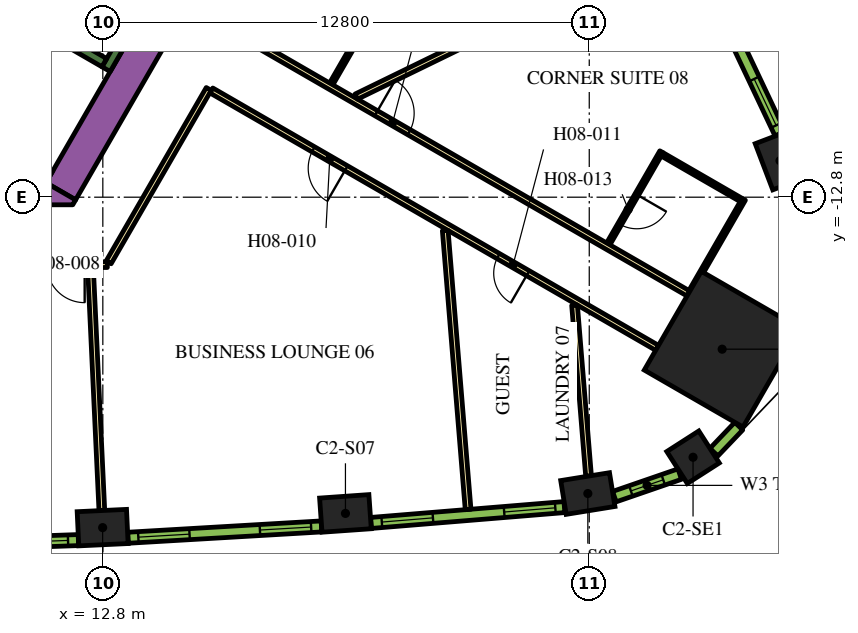
"""IFC4 building model, lengths in metres.
Left out: names, types, materials, properties, quantities, classifications, styles, units other than length and angle.
Written with IfcOpenShell. Run it as: python <this file> out.ifc"""

import sys

from ifc_helpers import new_model, si_unit, direction, frame, frame_2d, origin, origin_2d, place, context, subcontext, project, spatial, polyline, rectangle, outline, extrude, element, fill, save


model = new_model("IFC4")
c1 = context("Model", 3, precision=1e-05, world=origin(), true_north=direction((0.0, 1.0)))
c2 = subcontext(c1, "Body", "Model", "MODEL_VIEW")
j1 = project(units=[si_unit("LENGTHUNIT", "METRE"), si_unit("PLANEANGLEUNIT", "RADIAN")], contexts=[c1])
p1 = place(None, origin())
s1 = spatial("IfcSite", under=j1, at=p1, CompositionType="ELEMENT")
p2 = place(p1, origin())
s2 = spatial("IfcBuilding", under=s1, at=p2, CompositionType="ELEMENT")
p3 = place(p2, frame((0.0, 0.0, 107.1)))
s3 = spatial("IfcBuildingStorey", under=s2, at=p3, CompositionType="ELEMENT", Elevation=107.1)
p4 = place(p3, frame((29.097, -16.799, 0.0), z_axis=(0.0, 0.0, 1.0), x_axis=(0.866025403784, -0.5, 0.0)))
e1 = element("IfcColumn", 1, at=p4, inside=s3, PredefinedType="COLUMN", context=c2, shape_type="SweptSolid", body=[
    extrude(rectangle(XDim=3.0, YDim=3.0, at=origin_2d()), origin(), (0.0, 0.0, 1.0), 3.9),
])
for number, where, z_axis, x_axis in (
    (2, (12.795, -21.494, 0.0), (0.0, 0.0, 1.0), (0.999, 0.047, 0.0)),
    (3, (19.184, -21.12, 0.0), (0.0, 0.0, 1.0), (0.998, 0.07, 0.0)),
    (4, (25.563, -20.597, 0.0), (0.0, 0.0, 1.0), (0.987, 0.159, 0.0)),
):
    element("IfcColumn", number, at=place(p3, frame(where, z_axis=z_axis, x_axis=x_axis)), inside=s3, PredefinedType="COLUMN", context=c2, shape_type="SweptSolid", body=[
        extrude(rectangle(XDim=1.3, YDim=0.9, at=origin_2d()), origin(), (0.0, 0.0, 1.0), 3.9),
    ])
p5 = place(p3, frame((28.331, -19.643, 0.0), z_axis=(0.0, 0.0, 1.0), x_axis=(0.841700252504, 0.53994507585, 0.0)))
e5 = element("IfcColumn", 5, at=p5, inside=s3, PredefinedType="COLUMN", context=c2, shape_type="SweptSolid", body=[
    extrude(rectangle(XDim=1.0, YDim=1.0, at=origin_2d()), origin(), (0.0, 0.0, 1.0), 3.9),
])
p6 = place(p3, frame((30.619, -11.839, 0.0), z_axis=(0.0, 0.0, 1.0), x_axis=(-0.355493616145, 0.934678708905, 0.0)))
e6 = element("IfcColumn", 6, at=p6, inside=s3, PredefinedType="COLUMN", context=c2, shape_type="SweptSolid", body=[
    extrude(rectangle(XDim=1.3, YDim=0.9, at=origin_2d()), origin(), (0.0, 0.0, 1.0), 3.9),
])
p7 = place(p3, frame((11.695, -12.644, 0.0), z_axis=(0.0, 0.0, 1.0), x_axis=(0.500010229568, 0.86601949766, 0.0)))
e7 = element("IfcWall", 7, at=p7, inside=s3, PredefinedType="SOLIDWALL", context=c2, shape_type="SweptSolid", body=[
    extrude(rectangle(XDim=9.326, YDim=0.9, at=frame_2d((4.663, 0.0))), origin(), (0.0, 0.0, 1.0), 3.9),
])
p8 = place(p3, origin())
e8 = element("IfcWall", 8, at=p8, inside=s3, PredefinedType="SOLIDWALL", context=c2, shape_type="SweptSolid", body=[
    extrude(outline(polyline([(12.009, -13.0), (11.312, -13.0), (11.312, -12.425), (12.083, -12.871), (12.009, -13.0)])), origin(), (0.0, 0.0, 1.0), 3.9),
])
e9 = element("IfcWall", 9, at=p8, inside=s3, PredefinedType="SOLIDWALL", context=c2, shape_type="SweptSolid", body=[
    extrude(outline(polyline([(11.489, -12.1), (11.312, -12.407), (11.312, -12.1), (11.489, -12.1)])), origin(), (0.0, 0.0, 1.0), 3.9),
])
p9 = place(p3, frame((12.885, -9.431, 0.0), z_axis=(0.0, 0.0, 1.0), x_axis=(0.500020560727, 0.866013532718, 0.0)))
e10 = element("IfcWall", 10, at=p9, inside=s3, PredefinedType="SOLIDWALL", context=c2, shape_type="SweptSolid", body=[
    extrude(rectangle(XDim=3.45, YDim=0.25, at=frame_2d((1.725, 0.0))), origin(), (0.0, 0.0, 1.0), 3.9),
])
p10 = place(p3, frame((12.84, -9.261, 0.0), z_axis=(0.0, 0.0, 1.0), x_axis=(-0.866013990052, 0.500019768644, 0.0)))
e11 = element("IfcWall", 11, at=p10, inside=s3, PredefinedType="SOLIDWALL", context=c2, shape_type="SweptSolid", body=[
    extrude(rectangle(XDim=6.8, YDim=0.25, at=frame_2d((3.4, 0.0))), origin(), (0.0, 0.0, 1.0), 3.9),
])
p11 = place(p3, frame((16.412, -8.523, 0.0), z_axis=(0.0, 0.0, 1.0), x_axis=(0.866025629663, -0.499999608766, 0.0)))
e12 = element("IfcWall", 12, at=p11, inside=s3, PredefinedType="PARTITIONING", context=c2, shape_type="SweptSolid", body=[
    extrude(rectangle(XDim=13.624, YDim=0.15, at=frame_2d((6.812, 0.0))), origin(), (0.0, 0.0, 1.0), 2.75),
])
p12 = place(p11, frame((4.134, 0.0, 0.0)))
e13 = element("IfcOpeningElement", 13, at=p12, cuts=e12, PredefinedType="OPENING", context=c2, shape_type="SweptSolid", body=[
    extrude(rectangle(XDim=1.0, YDim=2.1, at=frame_2d((0.5, 1.05))), frame((0.0, 0.085, 0.0), z_axis=(0.0, -1.0, 0.0), x_axis=(1.0, 0.0, 0.0)), (0.0, 0.0, 1.0), 0.17),
])
p13 = place(p3, frame((12.918, -14.575, 0.0), z_axis=(0.0, 0.0, 1.0), x_axis=(-1.0, 0.0, 0.0)))
e14 = element("IfcWall", 14, at=p13, inside=s3, PredefinedType="PARTITIONING", context=c2, shape_type="SweptSolid", body=[
    extrude(rectangle(XDim=25.766, YDim=0.15, at=frame_2d((12.883, 0.0))), origin(), (0.0, 0.0, 1.0), 2.75),
])
p14 = place(p13, frame((24.586, 0.0, 0.0)))
e15 = element("IfcOpeningElement", 15, at=p14, cuts=e14, PredefinedType="OPENING", context=c2, shape_type="SweptSolid", body=[
    extrude(rectangle(XDim=1.0, YDim=2.1, at=frame_2d((0.5, 1.05))), frame((0.0, 0.085, 0.0), z_axis=(0.0, -1.0, 0.0), x_axis=(1.0, 0.0, 0.0)), (0.0, 0.0, 1.0), 0.17),
])
p15 = place(p13, frame((13.144, 0.0, 0.0)))
e16 = element("IfcOpeningElement", 16, at=p15, cuts=e14, PredefinedType="OPENING", context=c2, shape_type="SweptSolid", body=[
    extrude(rectangle(XDim=1.0, YDim=2.1, at=frame_2d((0.5, 1.05))), frame((0.0, 0.085, 0.0), z_axis=(0.0, -1.0, 0.0), x_axis=(1.0, 0.0, 0.0)), (0.0, 0.0, 1.0), 0.17),
])
p16 = place(p13, frame((10.874, 0.0, 0.0)))
e17 = element("IfcOpeningElement", 17, at=p16, cuts=e14, PredefinedType="OPENING", context=c2, shape_type="SweptSolid", body=[
    extrude(rectangle(XDim=0.9, YDim=2.1, at=frame_2d((0.45, 1.05))), frame((0.0, 0.085, 0.0), z_axis=(0.0, -1.0, 0.0), x_axis=(1.0, 0.0, 0.0)), (0.0, 0.0, 1.0), 0.17),
])
p17 = place(p13, frame((0.596, 0.0, 0.0)))
e18 = element("IfcOpeningElement", 18, at=p17, cuts=e14, PredefinedType="OPENING", context=c2, shape_type="SweptSolid", body=[
    extrude(rectangle(XDim=1.0, YDim=2.1, at=frame_2d((0.5, 1.05))), frame((0.0, 0.085, 0.0), z_axis=(0.0, -1.0, 0.0), x_axis=(1.0, 0.0, 0.0)), (0.0, 0.0, 1.0), 0.17),
])
p18 = place(p3, frame((15.587, -9.952, 0.0), z_axis=(0.0, 0.0, 1.0), x_axis=(-0.500016618951, -0.866015808616, 0.0)))
e19 = element("IfcWall", 19, at=p18, inside=s3, PredefinedType="PARTITIONING", context=c2, shape_type="SweptSolid", body=[
    extrude(rectangle(XDim=5.268, YDim=0.15, at=frame_2d((2.634, 0.0))), origin(), (0.0, 0.0, 1.0), 2.75),
])
p19 = place(p3, frame((27.386, -16.764, 0.0), z_axis=(0.0, 0.0, 1.0), x_axis=(-0.866022585856, 0.500004880763, 0.0)))
e20 = element("IfcWall", 20, at=p19, inside=s3, PredefinedType="PARTITIONING", context=c2, shape_type="SweptSolid", body=[
    extrude(rectangle(XDim=13.544, YDim=0.15, at=frame_2d((6.772, 0.0))), origin(), (0.0, 0.0, 1.0), 2.75),
])
p20 = place(p19, frame((9.447, 0.0, 0.0)))
e21 = element("IfcOpeningElement", 21, at=p20, cuts=e20, PredefinedType="OPENING", context=c2, shape_type="SweptSolid", body=[
    extrude(rectangle(XDim=1.0, YDim=2.1, at=frame_2d((0.5, 1.05))), frame((0.0, 0.085, 0.0), z_axis=(0.0, -1.0, 0.0), x_axis=(1.0, 0.0, 0.0)), (0.0, 0.0, 1.0), 0.17),
])
p21 = place(p19, frame((3.926, 0.0, 0.0)))
e22 = element("IfcOpeningElement", 22, at=p21, cuts=e20, PredefinedType="OPENING", context=c2, shape_type="SweptSolid", body=[
    extrude(rectangle(XDim=0.9, YDim=2.1, at=frame_2d((0.45, 1.05))), frame((0.0, 0.085, 0.0), z_axis=(0.0, -1.0, 0.0), x_axis=(1.0, 0.0, 0.0)), (0.0, 0.0, 1.0), 0.17),
])
p22 = place(p3, frame((12.774, -21.045, 0.0), z_axis=(0.0, 0.0, 1.0), x_axis=(-0.046750341626, 0.998906605023, 0.0)))
e23 = element("IfcWall", 23, at=p22, inside=s3, PredefinedType="PARTITIONING", context=c2, shape_type="SweptSolid", body=[
    extrude(rectangle(XDim=6.392, YDim=0.15, at=frame_2d((3.196, 0.0))), origin(), (0.0, 0.0, 1.0), 2.75),
])
p23 = place(p3, frame((27.478, -6.251, 0.0), z_axis=(0.0, 0.0, 1.0), x_axis=(-0.898940618603, -0.438070501432, 0.0)))
e24 = element("IfcWall", 24, at=p23, inside=s3, PredefinedType="PARTITIONING", context=c2, shape_type="SweptSolid", body=[
    extrude(rectangle(XDim=8.909, YDim=0.15, at=frame_2d((4.455, 0.0))), origin(), (0.0, 0.0, 1.0), 2.75),
])
p24 = place(p3, frame((22.412, -21.016, 0.0), z_axis=(0.0, 0.0, 1.0), x_axis=(-0.081744540534, 0.996653314896, 0.0)))
e25 = element("IfcWall", 25, at=p24, inside=s3, PredefinedType="PARTITIONING", context=c2, shape_type="SweptSolid", body=[
    extrude(rectangle(XDim=7.362, YDim=0.15, at=frame_2d((3.681, 0.0))), origin(), (0.0, 0.0, 1.0), 2.75),
])
p25 = place(p3, frame((25.582, -20.138, 0.0), z_axis=(0.0, 0.0, 1.0), x_axis=(-0.081746132986, 0.996653184283, 0.0)))
e26 = element("IfcWall", 26, at=p25, inside=s3, PredefinedType="PARTITIONING", context=c2, shape_type="SweptSolid", body=[
    extrude(rectangle(XDim=4.51, YDim=0.15, at=frame_2d((2.255, 0.0))), origin(), (0.0, 0.0, 1.0), 2.75),
])
p26 = place(p3, frame((27.5, -11.605, 0.0), z_axis=(0.0, 0.0, 1.0), x_axis=(-0.500049511043, -0.865996816683, 0.0)))
e27 = element("IfcWall", 27, at=p26, inside=s3, PredefinedType="PARTITIONING", context=c2, shape_type="SweptSolid", body=[
    extrude(rectangle(XDim=2.8, YDim=0.1, at=frame_2d((1.4, 0.0))), origin(), (0.0, 0.0, 1.0), 2.75),
])
p27 = place(p26, frame((1.3, 0.0, 0.0)))
e28 = element("IfcOpeningElement", 28, at=p27, cuts=e27, PredefinedType="OPENING", context=c2, shape_type="SweptSolid", body=[
    extrude(rectangle(XDim=0.9, YDim=2.1, at=frame_2d((0.45, 1.05))), frame((0.0, 0.06, 0.0), z_axis=(0.0, -1.0, 0.0), x_axis=(1.0, 0.0, 0.0)), (0.0, 0.0, 1.0), 0.12),
])
p28 = place(p3, frame((27.519, -11.673, 0.0), z_axis=(0.0, 0.0, 1.0), x_axis=(0.866024647952, -0.500001309137, 0.0)))
e29 = element("IfcWall", 29, at=p28, inside=s3, PredefinedType="PARTITIONING", context=c2, shape_type="SweptSolid", body=[
    extrude(rectangle(XDim=2.4, YDim=0.1, at=frame_2d((1.2, 0.0))), origin(), (0.0, 0.0, 1.0), 2.75),
])
p29 = place(p3, frame((28.265, -15.28, 0.0), z_axis=(0.0, 0.0, 1.0), x_axis=(0.500049511043, 0.865996816683, 0.0)))
e30 = element("IfcWall", 30, at=p29, inside=s3, PredefinedType="PARTITIONING", context=c2, shape_type="SweptSolid", body=[
    extrude(rectangle(XDim=2.8, YDim=0.1, at=frame_2d((1.4, 0.0))), origin(), (0.0, 0.0, 1.0), 2.75),
])
p30 = place(p3, frame((19.877, -7.972, 0.0), z_axis=(0.0, 0.0, 1.0), x_axis=(-0.500010206181, -0.866019511163, 0.0)))
e31 = element("IfcWall", 31, at=p30, inside=s3, PredefinedType="PARTITIONING", context=c2, shape_type="SweptSolid", body=[
    extrude(rectangle(XDim=2.13, YDim=0.1, at=frame_2d((1.065, 0.0))), origin(), (0.0, 0.0, 1.0), 2.75),
])
p31 = place(p3, frame((7.059, -22.001, 0.0), z_axis=(0.0, 0.0, 1.0), x_axis=(0.999385993957, 0.035037623812, 0.0)))
e32 = element("IfcWall", 32, at=p31, inside=s3, PredefinedType="SOLIDWALL", context=c2, shape_type="SweptSolid", body=[
    extrude(rectangle(XDim=5.101, YDim=0.29, at=frame_2d((2.55, 0.0))), origin(), (0.0, 0.0, 1.0), 3.65),
])
p32 = place(p31, frame((0.273, 0.0, 0.9)))
e33 = element("IfcOpeningElement", 33, at=p32, cuts=e32, PredefinedType="OPENING", context=c2, shape_type="SweptSolid", body=[
    extrude(rectangle(XDim=1.35, YDim=2.15, at=frame_2d((0.675, 1.075))), frame((0.0, 0.155, 0.0), z_axis=(0.0, -1.0, 0.0), x_axis=(1.0, 0.0, 0.0)), (0.0, 0.0, 1.0), 0.31),
])
p33 = place(p31, frame((3.478, 0.0, 0.9)))
e34 = element("IfcOpeningElement", 34, at=p33, cuts=e32, PredefinedType="OPENING", context=c2, shape_type="SweptSolid", body=[
    extrude(rectangle(XDim=1.35, YDim=2.15, at=frame_2d((0.675, 1.075))), frame((0.0, 0.155, 0.0), z_axis=(0.0, -1.0, 0.0), x_axis=(1.0, 0.0, 0.0)), (0.0, 0.0, 1.0), 0.31),
])
p34 = place(p3, frame((13.462, -21.761, 0.0), z_axis=(0.0, 0.0, 1.0), x_axis=(0.998290511436, 0.058447025388, 0.0)))
e35 = element("IfcWall", 35, at=p34, inside=s3, PredefinedType="SOLIDWALL", context=c2, shape_type="SweptSolid", body=[
    extrude(rectangle(XDim=5.1, YDim=0.29, at=frame_2d((2.55, 0.0))), origin(), (0.0, 0.0, 1.0), 3.65),
])
p35 = place(p34, frame((0.272, 0.0, 0.9)))
e36 = element("IfcOpeningElement", 36, at=p35, cuts=e35, PredefinedType="OPENING", context=c2, shape_type="SweptSolid", body=[
    extrude(rectangle(XDim=1.35, YDim=2.15, at=frame_2d((0.675, 1.075))), frame((0.0, 0.155, 0.0), z_axis=(0.0, -1.0, 0.0), x_axis=(1.0, 0.0, 0.0)), (0.0, 0.0, 1.0), 0.31),
])
p36 = place(p34, frame((3.478, 0.0, 0.9)))
e37 = element("IfcOpeningElement", 37, at=p36, cuts=e35, PredefinedType="OPENING", context=c2, shape_type="SweptSolid", body=[
    extrude(rectangle(XDim=1.35, YDim=2.15, at=frame_2d((0.675, 1.075))), frame((0.0, 0.155, 0.0), z_axis=(0.0, -1.0, 0.0), x_axis=(1.0, 0.0, 0.0)), (0.0, 0.0, 1.0), 0.31),
])
p37 = place(p3, frame((19.857, -21.371, 0.0), z_axis=(0.0, 0.0, 1.0), x_axis=(0.99665273362, 0.081751627308, 0.0)))
e38 = element("IfcWall", 38, at=p37, inside=s3, PredefinedType="SOLIDWALL", context=c2, shape_type="SweptSolid", body=[
    extrude(rectangle(XDim=5.107, YDim=0.29, at=frame_2d((2.553, 0.0))), origin(), (0.0, 0.0, 1.0), 3.65),
])
p38 = place(p37, frame((0.285, 0.0, 0.9)))
e39 = element("IfcOpeningElement", 39, at=p38, cuts=e38, PredefinedType="OPENING", context=c2, shape_type="SweptSolid", body=[
    extrude(rectangle(XDim=1.35, YDim=2.15, at=frame_2d((0.675, 1.075))), frame((0.0, 0.155, 0.0), z_axis=(0.0, -1.0, 0.0), x_axis=(1.0, 0.0, 0.0)), (0.0, 0.0, 1.0), 0.31),
])
p39 = place(p37, frame((3.516, 0.0, 0.9)))
e40 = element("IfcOpeningElement", 40, at=p39, cuts=e38, PredefinedType="OPENING", context=c2, shape_type="SweptSolid", body=[
    extrude(rectangle(XDim=1.35, YDim=2.15, at=frame_2d((0.675, 1.075))), frame((0.0, 0.155, 0.0), z_axis=(0.0, -1.0, 0.0), x_axis=(1.0, 0.0, 0.0)), (0.0, 0.0, 1.0), 0.31),
])
p40 = place(p3, frame((26.261, -20.679, 0.0), z_axis=(0.0, 0.0, 1.0), x_axis=(0.945385815453, 0.325953462844, 0.0)))
e41 = element("IfcWall", 41, at=p40, inside=s3, PredefinedType="SOLIDWALL", context=c2, shape_type="SweptSolid", body=[
    extrude(rectangle(XDim=1.819, YDim=0.29, at=frame_2d((0.91, 0.0))), origin(), (0.0, 0.0, 1.0), 3.65),
])
p41 = place(p40, frame((0.46, 0.0, 0.9)))
e42 = element("IfcOpeningElement", 42, at=p41, cuts=e41, PredefinedType="OPENING", context=c2, shape_type="SweptSolid", body=[
    extrude(rectangle(XDim=0.9, YDim=2.15, at=frame_2d((0.45, 1.075))), frame((0.0, 0.155, 0.0), z_axis=(0.0, -1.0, 0.0), x_axis=(1.0, 0.0, 0.0)), (0.0, 0.0, 1.0), 0.31),
])
p42 = place(p3, frame((28.88, -19.509, 0.0), z_axis=(0.0, 0.0, 1.0), x_axis=(0.690414427296, 0.723414071319, 0.0)))
e43 = element("IfcWall", 43, at=p42, inside=s3, PredefinedType="SOLIDWALL", context=c2, shape_type="SweptSolid", body=[
    extrude(rectangle(XDim=0.947, YDim=0.29, at=frame_2d((0.474, 0.0))), origin(), (0.0, 0.0, 1.0), 3.65),
])
p43 = place(p3, frame((30.62, -11.127, 0.0), z_axis=(0.0, 0.0, 1.0), x_axis=(-0.427543726596, 0.903994669148, 0.0)))
e44 = element("IfcWall", 44, at=p43, inside=s3, PredefinedType="SOLIDWALL", context=c2, shape_type="SweptSolid", body=[
    extrude(rectangle(XDim=5.107, YDim=0.29, at=frame_2d((2.553, 0.0))), origin(), (0.0, 0.0, 1.0), 3.65),
])
p44 = place(p43, frame((0.24, 0.0, 0.9)))
e45 = element("IfcOpeningElement", 45, at=p44, cuts=e44, PredefinedType="OPENING", context=c2, shape_type="SweptSolid", body=[
    extrude(rectangle(XDim=1.35, YDim=2.15, at=frame_2d((0.675, 1.075))), frame((0.0, 0.155, 0.0), z_axis=(0.0, -1.0, 0.0), x_axis=(1.0, 0.0, 0.0)), (0.0, 0.0, 1.0), 0.31),
])
p45 = place(p43, frame((3.471, 0.0, 0.9)))
e46 = element("IfcOpeningElement", 46, at=p45, cuts=e44, PredefinedType="OPENING", context=c2, shape_type="SweptSolid", body=[
    extrude(rectangle(XDim=1.35, YDim=2.15, at=frame_2d((0.675, 1.075))), frame((0.0, 0.155, 0.0), z_axis=(0.0, -1.0, 0.0), x_axis=(1.0, 0.0, 0.0)), (0.0, 0.0, 1.0), 0.31),
])
p46 = place(p17, origin())
e47 = element("IfcDoor", 47, at=p46, inside=s3, OperationType="SINGLE_SWING_LEFT", PredefinedType="DOOR", context=c2, shape_type="SweptSolid", body=[
    extrude(rectangle(XDim=1.0, YDim=2.1, at=frame_2d((0.5, 1.05))), frame((0.0, 0.025, 0.0), z_axis=(0.0, -1.0, 0.0), x_axis=(1.0, 0.0, 0.0)), (0.0, 0.0, 1.0), 0.05),
])
fill(e18, e47)
p47 = place(p20, origin())
e48 = element("IfcDoor", 48, at=p47, inside=s3, OperationType="SINGLE_SWING_RIGHT", PredefinedType="DOOR", context=c2, shape_type="SweptSolid", body=[
    extrude(rectangle(XDim=1.0, YDim=2.1, at=frame_2d((0.5, 1.05))), frame((0.0, 0.025, 0.0), z_axis=(0.0, -1.0, 0.0), x_axis=(1.0, 0.0, 0.0)), (0.0, 0.0, 1.0), 0.05),
])
fill(e21, e48)
p48 = place(p21, origin())
e49 = element("IfcDoor", 49, at=p48, inside=s3, OperationType="SINGLE_SWING_LEFT", PredefinedType="DOOR", context=c2, shape_type="SweptSolid", body=[
    extrude(rectangle(XDim=0.9, YDim=2.1, at=frame_2d((0.45, 1.05))), frame((0.0, 0.025, 0.0), z_axis=(0.0, -1.0, 0.0), x_axis=(1.0, 0.0, 0.0)), (0.0, 0.0, 1.0), 0.05),
])
fill(e22, e49)
p49 = place(p12, origin())
e50 = element("IfcDoor", 50, at=p49, inside=s3, OperationType="SINGLE_SWING_LEFT", PredefinedType="DOOR", context=c2, shape_type="SweptSolid", body=[
    extrude(rectangle(XDim=1.0, YDim=2.1, at=frame_2d((0.5, 1.05))), frame((0.0, 0.025, 0.0), z_axis=(0.0, -1.0, 0.0), x_axis=(1.0, 0.0, 0.0)), (0.0, 0.0, 1.0), 0.05),
])
fill(e13, e50)
p50 = place(p27, origin())
e51 = element("IfcDoor", 51, at=p50, inside=s3, OperationType="SINGLE_SWING_LEFT", PredefinedType="DOOR", context=c2, shape_type="SweptSolid", body=[
    extrude(rectangle(XDim=0.9, YDim=2.1, at=frame_2d((0.45, 1.05))), frame((0.0, 0.025, 0.0), z_axis=(0.0, -1.0, 0.0), x_axis=(1.0, 0.0, 0.0)), (0.0, 0.0, 1.0), 0.05),
])
fill(e28, e51)
p51 = place(p33, origin())
e52 = element("IfcWindow", 52, at=p51, inside=s3, PartitioningType="DOUBLE_PANEL_VERTICAL", PredefinedType="WINDOW", context=c2, shape_type="SweptSolid", body=[
    extrude(rectangle(XDim=1.35, YDim=2.15, at=frame_2d((0.675, 1.075))), frame((0.0, 0.015, 0.0), z_axis=(0.0, -1.0, 0.0), x_axis=(1.0, 0.0, 0.0)), (0.0, 0.0, 1.0), 0.06),
])
fill(e34, e52)
p52 = place(p35, origin())
e53 = element("IfcWindow", 53, at=p52, inside=s3, PartitioningType="DOUBLE_PANEL_VERTICAL", PredefinedType="WINDOW", context=c2, shape_type="SweptSolid", body=[
    extrude(rectangle(XDim=1.35, YDim=2.15, at=frame_2d((0.675, 1.075))), frame((0.0, 0.015, 0.0), z_axis=(0.0, -1.0, 0.0), x_axis=(1.0, 0.0, 0.0)), (0.0, 0.0, 1.0), 0.06),
])
fill(e36, e53)
p53 = place(p36, origin())
e54 = element("IfcWindow", 54, at=p53, inside=s3, PartitioningType="DOUBLE_PANEL_VERTICAL", PredefinedType="WINDOW", context=c2, shape_type="SweptSolid", body=[
    extrude(rectangle(XDim=1.35, YDim=2.15, at=frame_2d((0.675, 1.075))), frame((0.0, 0.015, 0.0), z_axis=(0.0, -1.0, 0.0), x_axis=(1.0, 0.0, 0.0)), (0.0, 0.0, 1.0), 0.06),
])
fill(e37, e54)
p54 = place(p38, origin())
e55 = element("IfcWindow", 55, at=p54, inside=s3, PartitioningType="DOUBLE_PANEL_VERTICAL", PredefinedType="WINDOW", context=c2, shape_type="SweptSolid", body=[
    extrude(rectangle(XDim=1.35, YDim=2.15, at=frame_2d((0.675, 1.075))), frame((0.0, 0.015, 0.0), z_axis=(0.0, -1.0, 0.0), x_axis=(1.0, 0.0, 0.0)), (0.0, 0.0, 1.0), 0.06),
])
fill(e39, e55)
p55 = place(p39, origin())
e56 = element("IfcWindow", 56, at=p55, inside=s3, PartitioningType="DOUBLE_PANEL_VERTICAL", PredefinedType="WINDOW", context=c2, shape_type="SweptSolid", body=[
    extrude(rectangle(XDim=1.35, YDim=2.15, at=frame_2d((0.675, 1.075))), frame((0.0, 0.015, 0.0), z_axis=(0.0, -1.0, 0.0), x_axis=(1.0, 0.0, 0.0)), (0.0, 0.0, 1.0), 0.06),
])
fill(e40, e56)
p56 = place(p41, origin())
e57 = element("IfcWindow", 57, at=p56, inside=s3, PartitioningType="SINGLE_PANEL", PredefinedType="WINDOW", context=c2, shape_type="SweptSolid", body=[
    extrude(rectangle(XDim=0.9, YDim=2.15, at=frame_2d((0.45, 1.075))), frame((0.0, 0.015, 0.0), z_axis=(0.0, -1.0, 0.0), x_axis=(1.0, 0.0, 0.0)), (0.0, 0.0, 1.0), 0.06),
])
fill(e42, e57)
p57 = place(p44, origin())
e58 = element("IfcWindow", 58, at=p57, inside=s3, PartitioningType="DOUBLE_PANEL_VERTICAL", PredefinedType="WINDOW", context=c2, shape_type="SweptSolid", body=[
    extrude(rectangle(XDim=1.35, YDim=2.15, at=frame_2d((0.675, 1.075))), frame((0.0, 0.015, 0.0), z_axis=(0.0, -1.0, 0.0), x_axis=(1.0, 0.0, 0.0)), (0.0, 0.0, 1.0), 0.06),
])
fill(e45, e58)
save(model, sys.argv[1])
